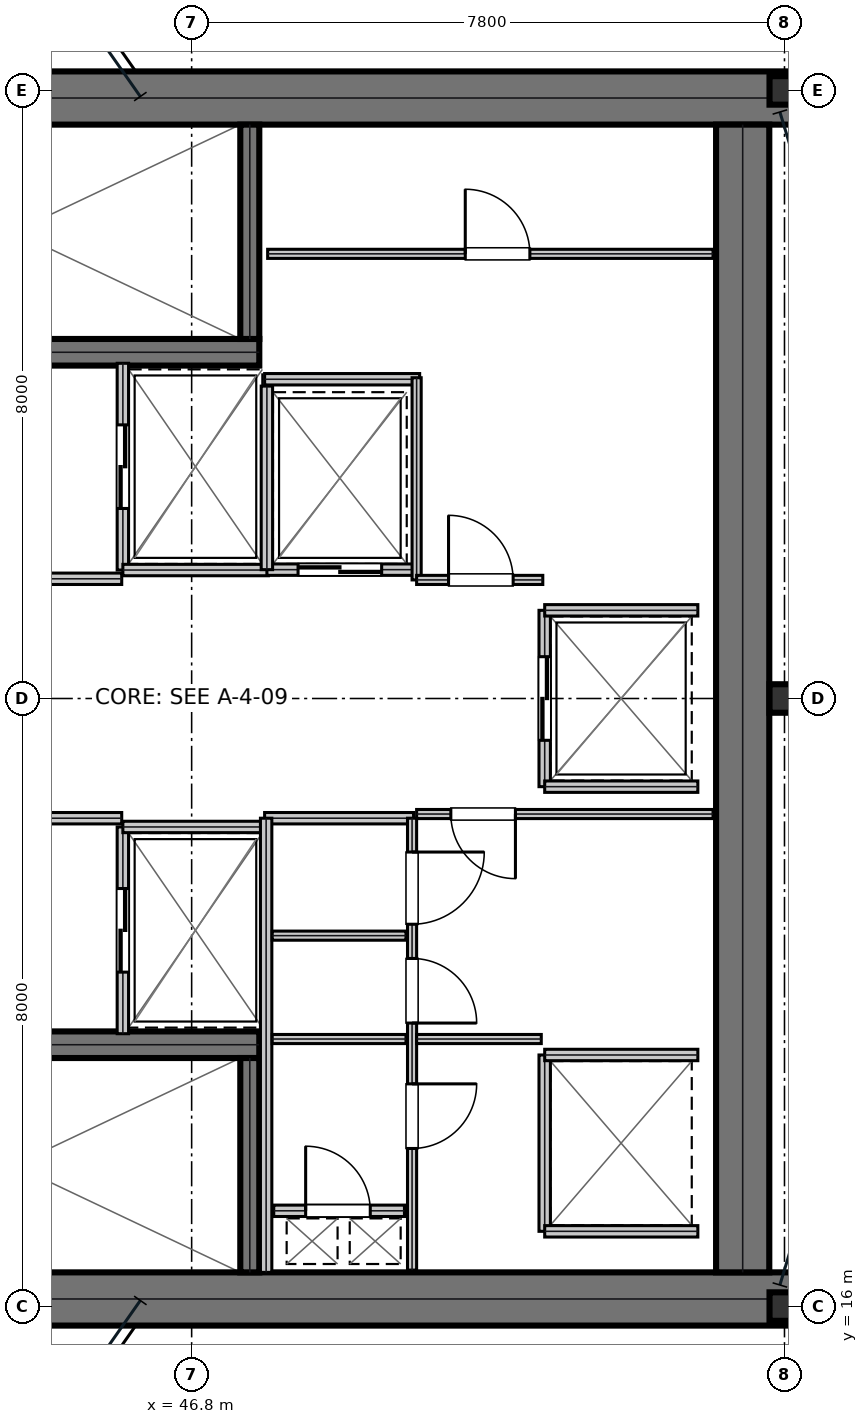
"""IFC4 building model, lengths in metres.
Left out: names, types, materials, properties, quantities, classifications, styles, units other than length and angle.
Written with IfcOpenShell. Run it as: python <this file> out.ifc"""

import sys

from ifc_helpers import new_model, si_unit, direction, frame, frame_2d, origin, origin_2d, place, context, subcontext, project, spatial, rectangle, i_section, extrude, element, fill, save


model = new_model("IFC4")
c1 = context("Model", 3, precision=1e-05, world=origin(), true_north=direction((0.0, 1.0)))
c2 = subcontext(c1, "Body", "Model", "MODEL_VIEW")
j1 = project(units=[si_unit("LENGTHUNIT", "METRE"), si_unit("PLANEANGLEUNIT", "RADIAN")], contexts=[c1])
p1 = place(None, origin())
s1 = spatial("IfcSite", under=j1, at=p1, CompositionType="ELEMENT")
p2 = place(p1, origin())
s2 = spatial("IfcBuilding", under=s1, at=p2, CompositionType="ELEMENT")
p3 = place(p2, frame((0.0, 0.0, 220.2)))
s3 = spatial("IfcBuildingStorey", under=s2, at=p3, CompositionType="ELEMENT", Elevation=220.2)
for number, where, z_axis, x_axis in (
    (1, (38.8, 31.9, 0.0), (0.0, 0.0, 1.0), (1.0, 0.0, 0.0)),
    (2, (38.8, 16.1, 0.0), (0.0, 0.0, 1.0), (1.0, 0.0, 0.0)),
):
    element("IfcWall", number, at=place(p3, frame(where, z_axis=z_axis, x_axis=x_axis)), inside=s3, PredefinedType="SHEAR", context=c2, shape_type="SweptSolid", body=[
        extrude(rectangle(XDim=16.0, YDim=0.7, at=frame_2d((8.0, 0.0))), origin(), (0.0, 0.0, 1.0), 3.79),
    ])
p4 = place(p3, frame((54.05, 16.45, 0.0), z_axis=(0.0, 0.0, 1.0), x_axis=(0.0, 1.0, 0.0)))
e3 = element("IfcWall", 3, at=p4, inside=s3, PredefinedType="SHEAR", context=c2, shape_type="SweptSolid", body=[
    extrude(rectangle(XDim=15.1, YDim=0.7, at=frame_2d((7.55, 0.0))), origin(), (0.0, 0.0, 1.0), 3.79),
])
p5 = place(p3, frame((39.98, 28.555, 0.0), z_axis=(0.0, 0.0, 1.0), x_axis=(1.0, 0.0, 0.0)))
e4 = element("IfcWall", 4, at=p5, inside=s3, PredefinedType="SHEAR", context=c2, shape_type="SweptSolid", body=[
    extrude(rectangle(XDim=7.71, YDim=0.35, at=frame_2d((3.855, 0.0))), origin(), (0.0, 0.0, 1.0), 3.79),
])
p6 = place(p5, frame((0.25, 0.0, 0.0)))
e5 = element("IfcOpeningElement", 5, at=p6, cuts=e4, PredefinedType="OPENING", context=c2, shape_type="SweptSolid", body=[
    extrude(rectangle(XDim=1.1, YDim=2.15, at=frame_2d((0.55, 1.075))), frame((0.0, 0.185, 0.0), z_axis=(0.0, -1.0, 0.0), x_axis=(1.0, 0.0, 0.0)), (0.0, 0.0, 1.0), 0.37),
])
p7 = place(p3, frame((39.98, 19.445, 0.0), z_axis=(0.0, 0.0, 1.0), x_axis=(1.0, 0.0, 0.0)))
e6 = element("IfcWall", 6, at=p7, inside=s3, PredefinedType="SHEAR", context=c2, shape_type="SweptSolid", body=[
    extrude(rectangle(XDim=7.71, YDim=0.35, at=frame_2d((3.855, 0.0))), origin(), (0.0, 0.0, 1.0), 3.79),
])
p8 = place(p7, frame((0.25, 0.0, 0.0)))
e7 = element("IfcOpeningElement", 7, at=p8, cuts=e6, PredefinedType="OPENING", context=c2, shape_type="SweptSolid", body=[
    extrude(rectangle(XDim=1.1, YDim=2.15, at=frame_2d((0.55, 1.075))), frame((0.0, 0.185, 0.0), z_axis=(0.0, -1.0, 0.0), x_axis=(1.0, 0.0, 0.0)), (0.0, 0.0, 1.0), 0.37),
])
for number, where, z_axis, x_axis in (
    (8, (47.565, 28.73, 0.0), (0.0, 0.0, 1.0), (0.0, 1.0, 0.0)),
    (9, (47.565, 16.45, 0.0), (0.0, 0.0, 1.0), (0.0, 1.0, 0.0)),
):
    element("IfcWall", number, at=place(p3, frame(where, z_axis=z_axis, x_axis=x_axis)), inside=s3, PredefinedType="SHEAR", context=c2, shape_type="SweptSolid", body=[
        extrude(rectangle(XDim=2.82, YDim=0.25, at=frame_2d((1.41, 0.0))), origin(), (0.0, 0.0, 1.0), 3.79),
    ])
for number, where, z_axis, x_axis in (
    (10, (54.6, 16.0, 0.0), (0.0, 0.0, 1.0), (1.0, 0.0, 0.0)),
    (11, (54.6, 24.0, 0.0), (0.0, 0.0, 1.0), (1.0, 0.0, 0.0)),
    (12, (54.6, 32.0, 0.0), (0.0, 0.0, 1.0), (1.0, 0.0, 0.0)),
):
    element("IfcColumn", number, at=place(p3, frame(where, z_axis=z_axis, x_axis=x_axis)), inside=s3, PredefinedType="COLUMN", context=c2, shape_type="SweptSolid", body=[
        extrude(i_section(OverallWidth=0.394, OverallDepth=0.375, WebThickness=0.017, FlangeThickness=0.028, at=origin_2d()), origin(), (0.0, 0.0, 1.0), 4.044),
    ])
p9 = place(p3, frame((39.98, 25.575, 0.0), z_axis=(0.0, 0.0, 1.0), x_axis=(1.0, 0.0, 0.0)))
e13 = element("IfcWall", 13, at=p9, inside=s3, PredefinedType="PARTITIONING", context=c2, shape_type="SweptSolid", body=[
    extrude(rectangle(XDim=5.9, YDim=0.15, at=frame_2d((2.95, 0.0))), origin(), (0.0, 0.0, 1.0), 3.79),
])
p10 = place(p9, frame((2.35, 0.0, 0.0)))
e14 = element("IfcOpeningElement", 14, at=p10, cuts=e13, PredefinedType="OPENING", context=c2, shape_type="SweptSolid", body=[
    extrude(rectangle(XDim=1.05, YDim=2.15, at=frame_2d((0.525, 1.075))), frame((0.0, 0.085, 0.0), z_axis=(0.0, -1.0, 0.0), x_axis=(1.0, 0.0, 0.0)), (0.0, 0.0, 1.0), 0.17),
])
p11 = place(p3, frame((39.98, 22.425, 0.0), z_axis=(0.0, 0.0, 1.0), x_axis=(1.0, 0.0, 0.0)))
e15 = element("IfcWall", 15, at=p11, inside=s3, PredefinedType="PARTITIONING", context=c2, shape_type="SweptSolid", body=[
    extrude(rectangle(XDim=5.9, YDim=0.15, at=frame_2d((2.95, 0.0))), origin(), (0.0, 0.0, 1.0), 3.79),
])
p12 = place(p11, frame((2.35, 0.0, 0.0)))
e16 = element("IfcOpeningElement", 16, at=p12, cuts=e15, PredefinedType="OPENING", context=c2, shape_type="SweptSolid", body=[
    extrude(rectangle(XDim=1.05, YDim=2.15, at=frame_2d((0.525, 1.075))), frame((0.0, 0.085, 0.0), z_axis=(0.0, -1.0, 0.0), x_axis=(1.0, 0.0, 0.0)), (0.0, 0.0, 1.0), 0.17),
])
p13 = place(p3, frame((45.895, 25.69, 0.0), z_axis=(0.0, 0.0, 1.0), x_axis=(0.0, 1.0, 0.0)))
e17 = element("IfcWall", 17, at=p13, inside=s3, PredefinedType="PARTITIONING", context=c2, shape_type="SweptSolid", body=[
    extrude(rectangle(XDim=2.72, YDim=0.15, at=frame_2d((1.36, 0.0))), origin(), (0.0, 0.0, 1.0), 3.79),
])
p14 = place(p13, frame((0.81, 0.0, 0.0)))
e18 = element("IfcOpeningElement", 18, at=p14, cuts=e17, PredefinedType="OPENING", context=c2, shape_type="SweptSolid", body=[
    extrude(rectangle(XDim=1.1, YDim=2.15, at=frame_2d((0.55, 1.075))), frame((0.0, 0.085, 0.0), z_axis=(0.0, -1.0, 0.0), x_axis=(1.0, 0.0, 0.0)), (0.0, 0.0, 1.0), 0.17),
])
p15 = place(p3, frame((45.895, 25.69, 0.0), z_axis=(0.0, 0.0, 1.0), x_axis=(1.0, 0.0, 0.0)))
e19 = element("IfcWall", 19, at=p15, inside=s3, PredefinedType="PARTITIONING", context=c2, shape_type="SweptSolid", body=[
    extrude(rectangle(XDim=1.915, YDim=0.15, at=frame_2d((0.958, 0.0))), origin(), (0.0, 0.0, 1.0), 3.79),
])
p16 = place(p3, frame((45.895, 19.59, 0.0), z_axis=(0.0, 0.0, 1.0), x_axis=(0.0, 1.0, 0.0)))
e20 = element("IfcWall", 20, at=p16, inside=s3, PredefinedType="PARTITIONING", context=c2, shape_type="SweptSolid", body=[
    extrude(rectangle(XDim=2.72, YDim=0.15, at=frame_2d((1.36, 0.0))), origin(), (0.0, 0.0, 1.0), 3.79),
])
p17 = place(p16, frame((0.81, 0.0, 0.0)))
e21 = element("IfcOpeningElement", 21, at=p17, cuts=e20, PredefinedType="OPENING", context=c2, shape_type="SweptSolid", body=[
    extrude(rectangle(XDim=1.1, YDim=2.15, at=frame_2d((0.55, 1.075))), frame((0.0, 0.085, 0.0), z_axis=(0.0, -1.0, 0.0), x_axis=(1.0, 0.0, 0.0)), (0.0, 0.0, 1.0), 0.17),
])
p18 = place(p3, frame((45.895, 22.31, 0.0), z_axis=(0.0, 0.0, 1.0), x_axis=(1.0, 0.0, 0.0)))
e22 = element("IfcWall", 22, at=p18, inside=s3, PredefinedType="PARTITIONING", context=c2, shape_type="SweptSolid", body=[
    extrude(rectangle(XDim=1.915, YDim=0.15, at=frame_2d((0.958, 0.0))), origin(), (0.0, 0.0, 1.0), 3.79),
])
p19 = place(p3, frame((47.79, 25.695, 0.0), z_axis=(0.0, 0.0, 1.0), x_axis=(1.0, 0.0, 0.0)))
e23 = element("IfcWall", 23, at=p19, inside=s3, PredefinedType="PARTITIONING", context=c2, shape_type="SweptSolid", body=[
    extrude(rectangle(XDim=1.92, YDim=0.15, at=frame_2d((0.96, 0.0))), origin(), (0.0, 0.0, 1.0), 3.79),
])
p20 = place(p19, frame((0.41, 0.0, 0.0)))
e24 = element("IfcOpeningElement", 24, at=p20, cuts=e23, PredefinedType="OPENING", context=c2, shape_type="SweptSolid", body=[
    extrude(rectangle(XDim=1.1, YDim=2.15, at=frame_2d((0.55, 1.075))), frame((0.0, 0.085, 0.0), z_axis=(0.0, -1.0, 0.0), x_axis=(1.0, 0.0, 0.0)), (0.0, 0.0, 1.0), 0.17),
])
p21 = place(p3, frame((47.79, 25.695, 0.0), z_axis=(0.0, 0.0, 1.0), x_axis=(0.0, 1.0, 0.0)))
e25 = element("IfcWall", 25, at=p21, inside=s3, PredefinedType="PARTITIONING", context=c2, shape_type="SweptSolid", body=[
    extrude(rectangle(XDim=2.415, YDim=0.15, at=frame_2d((1.208, 0.0))), origin(), (0.0, 0.0, 1.0), 3.79),
])
p22 = place(p3, frame((51.445, 22.84, 0.0), z_axis=(0.0, 0.0, 1.0), x_axis=(0.0, 1.0, 0.0)))
e26 = element("IfcWall", 26, at=p22, inside=s3, PredefinedType="PARTITIONING", context=c2, shape_type="SweptSolid", body=[
    extrude(rectangle(XDim=2.32, YDim=0.15, at=frame_2d((1.16, 0.0))), origin(), (0.0, 0.0, 1.0), 3.79),
])
p23 = place(p22, frame((0.61, 0.0, 0.0)))
e27 = element("IfcOpeningElement", 27, at=p23, cuts=e26, PredefinedType="OPENING", context=c2, shape_type="SweptSolid", body=[
    extrude(rectangle(XDim=1.1, YDim=2.15, at=frame_2d((0.55, 1.075))), frame((0.0, 0.085, 0.0), z_axis=(0.0, -1.0, 0.0), x_axis=(1.0, 0.0, 0.0)), (0.0, 0.0, 1.0), 0.17),
])
for number, where, z_axis, x_axis in (
    (28, (51.445, 22.84, 0.0), (0.0, 0.0, 1.0), (1.0, 0.0, 0.0)),
    (29, (51.445, 25.16, 0.0), (0.0, 0.0, 1.0), (1.0, 0.0, 0.0)),
):
    element("IfcWall", number, at=place(p3, frame(where, z_axis=z_axis, x_axis=x_axis)), inside=s3, PredefinedType="PARTITIONING", context=c2, shape_type="SweptSolid", body=[
        extrude(rectangle(XDim=2.015, YDim=0.15, at=frame_2d((1.007, 0.0))), origin(), (0.0, 0.0, 1.0), 3.79),
    ])
p24 = place(p3, frame((51.445, 16.99, 0.0), z_axis=(0.0, 0.0, 1.0), x_axis=(0.0, 1.0, 0.0)))
e30 = element("IfcWall", 30, at=p24, inside=s3, PredefinedType="PARTITIONING", context=c2, shape_type="SweptSolid", body=[
    extrude(rectangle(XDim=2.32, YDim=0.15, at=frame_2d((1.16, 0.0))), origin(), (0.0, 0.0, 1.0), 3.79),
])
for number, where, z_axis, x_axis in (
    (31, (51.445, 16.99, 0.0), (0.0, 0.0, 1.0), (1.0, 0.0, 0.0)),
    (32, (51.445, 19.31, 0.0), (0.0, 0.0, 1.0), (1.0, 0.0, 0.0)),
):
    element("IfcWall", number, at=place(p3, frame(where, z_axis=z_axis, x_axis=x_axis)), inside=s3, PredefinedType="PARTITIONING", context=c2, shape_type="SweptSolid", body=[
        extrude(rectangle(XDim=2.015, YDim=0.15, at=frame_2d((1.007, 0.0))), origin(), (0.0, 0.0, 1.0), 3.79),
    ])
p25 = place(p3, frame((47.88, 17.26, 0.0), z_axis=(0.0, 0.0, 1.0), x_axis=(1.0, 0.0, 0.0)))
e33 = element("IfcWall", 33, at=p25, inside=s3, PredefinedType="PARTITIONING", context=c2, shape_type="SweptSolid", body=[
    extrude(rectangle(XDim=1.72, YDim=0.15, at=frame_2d((0.86, 0.0))), origin(), (0.0, 0.0, 1.0), 3.79),
])
p26 = place(p25, frame((0.42, 0.0, 0.0)))
e34 = element("IfcOpeningElement", 34, at=p26, cuts=e33, PredefinedType="OPENING", context=c2, shape_type="SweptSolid", body=[
    extrude(rectangle(XDim=0.85, YDim=2.15, at=frame_2d((0.425, 1.075))), frame((0.0, 0.085, 0.0), z_axis=(0.0, -1.0, 0.0), x_axis=(1.0, 0.0, 0.0)), (0.0, 0.0, 1.0), 0.17),
])
p27 = place(p3, frame((47.76, 22.425, 0.0), z_axis=(0.0, 0.0, 1.0), x_axis=(1.0, 0.0, 0.0)))
e35 = element("IfcWall", 35, at=p27, inside=s3, PredefinedType="PARTITIONING", context=c2, shape_type="SweptSolid", body=[
    extrude(rectangle(XDim=1.96, YDim=0.15, at=frame_2d((0.98, 0.0))), origin(), (0.0, 0.0, 1.0), 3.79),
])
p28 = place(p3, frame((47.78, 16.45, 0.0), z_axis=(0.0, 0.0, 1.0), x_axis=(0.0, 1.0, 0.0)))
e36 = element("IfcWall", 36, at=p28, inside=s3, PredefinedType="PARTITIONING", context=c2, shape_type="SweptSolid", body=[
    extrude(rectangle(XDim=5.975, YDim=0.15, at=frame_2d((2.988, 0.0))), origin(), (0.0, 0.0, 1.0), 3.79),
])
for number, where, z_axis, x_axis in (
    (37, (47.86, 19.52, 0.0), (0.0, 0.0, 1.0), (1.0, 0.0, 0.0)),
    (38, (47.86, 20.88, 0.0), (0.0, 0.0, 1.0), (1.0, 0.0, 0.0)),
):
    element("IfcWall", number, at=place(p3, frame(where, z_axis=z_axis, x_axis=x_axis)), inside=s3, PredefinedType="PARTITIONING", context=c2, shape_type="SweptSolid", body=[
        extrude(rectangle(XDim=1.76, YDim=0.12, at=frame_2d((0.88, 0.0))), origin(), (0.0, 0.0, 1.0), 3.79),
    ])
p29 = place(p3, frame((49.7, 16.48, 0.0), z_axis=(0.0, 0.0, 1.0), x_axis=(0.0, 1.0, 0.0)))
e39 = element("IfcWall", 39, at=p29, inside=s3, PredefinedType="PARTITIONING", context=c2, shape_type="SweptSolid", body=[
    extrude(rectangle(XDim=5.945, YDim=0.12, at=frame_2d((2.973, 0.0))), origin(), (0.0, 0.0, 1.0), 3.79),
])
p30 = place(p29, frame((1.6, 0.0, 0.0)))
e40 = element("IfcOpeningElement", 40, at=p30, cuts=e39, PredefinedType="OPENING", context=c2, shape_type="SweptSolid", body=[
    extrude(rectangle(XDim=0.85, YDim=2.15, at=frame_2d((0.425, 1.075))), frame((0.0, 0.07, 0.0), z_axis=(0.0, -1.0, 0.0), x_axis=(1.0, 0.0, 0.0)), (0.0, 0.0, 1.0), 0.14),
])
p31 = place(p29, frame((3.25, 0.0, 0.0)))
e41 = element("IfcOpeningElement", 41, at=p31, cuts=e39, PredefinedType="OPENING", context=c2, shape_type="SweptSolid", body=[
    extrude(rectangle(XDim=0.85, YDim=2.15, at=frame_2d((0.425, 1.075))), frame((0.0, 0.07, 0.0), z_axis=(0.0, -1.0, 0.0), x_axis=(1.0, 0.0, 0.0)), (0.0, 0.0, 1.0), 0.14),
])
p32 = place(p29, frame((4.55, 0.0, 0.0)))
e42 = element("IfcOpeningElement", 42, at=p32, cuts=e39, PredefinedType="OPENING", context=c2, shape_type="SweptSolid", body=[
    extrude(rectangle(XDim=0.95, YDim=2.15, at=frame_2d((0.475, 1.075))), frame((0.0, 0.07, 0.0), z_axis=(0.0, -1.0, 0.0), x_axis=(1.0, 0.0, 0.0)), (0.0, 0.0, 1.0), 0.14),
])
p33 = place(p3, frame((49.76, 22.48, 0.0), z_axis=(0.0, 0.0, 1.0), x_axis=(1.0, 0.0, 0.0)))
e43 = element("IfcWall", 43, at=p33, inside=s3, PredefinedType="PARTITIONING", context=c2, shape_type="SweptSolid", body=[
    extrude(rectangle(XDim=3.9, YDim=0.12, at=frame_2d((1.95, 0.0))), origin(), (0.0, 0.0, 1.0), 3.79),
])
p34 = place(p33, frame((0.45, 0.0, 0.0)))
e44 = element("IfcOpeningElement", 44, at=p34, cuts=e43, PredefinedType="OPENING", context=c2, shape_type="SweptSolid", body=[
    extrude(rectangle(XDim=0.85, YDim=2.15, at=frame_2d((0.425, 1.075))), frame((0.0, 0.07, 0.0), z_axis=(0.0, -1.0, 0.0), x_axis=(1.0, 0.0, 0.0)), (0.0, 0.0, 1.0), 0.14),
])
p35 = place(p3, frame((49.76, 19.52, 0.0), z_axis=(0.0, 0.0, 1.0), x_axis=(1.0, 0.0, 0.0)))
e45 = element("IfcWall", 45, at=p35, inside=s3, PredefinedType="PARTITIONING", context=c2, shape_type="SweptSolid", body=[
    extrude(rectangle(XDim=1.64, YDim=0.12, at=frame_2d((0.82, 0.0))), origin(), (0.0, 0.0, 1.0), 3.79),
])
p36 = place(p3, frame((47.76, 28.2, 0.0), z_axis=(0.0, 0.0, 1.0), x_axis=(1.0, 0.0, 0.0)))
e46 = element("IfcWall", 46, at=p36, inside=s3, PredefinedType="PARTITIONING", context=c2, shape_type="SweptSolid", body=[
    extrude(rectangle(XDim=2.04, YDim=0.15, at=frame_2d((1.02, 0.0))), origin(), (0.0, 0.0, 1.0), 3.79),
])
p37 = place(p3, frame((49.76, 25.56, 0.0), z_axis=(0.0, 0.0, 1.0), x_axis=(0.0, 1.0, 0.0)))
e47 = element("IfcWall", 47, at=p37, inside=s3, PredefinedType="PARTITIONING", context=c2, shape_type="SweptSolid", body=[
    extrude(rectangle(XDim=2.66, YDim=0.12, at=frame_2d((1.33, 0.0))), origin(), (0.0, 0.0, 1.0), 3.79),
])
p38 = place(p3, frame((49.76, 25.56, 0.0), z_axis=(0.0, 0.0, 1.0), x_axis=(1.0, 0.0, 0.0)))
e48 = element("IfcWall", 48, at=p38, inside=s3, PredefinedType="PARTITIONING", context=c2, shape_type="SweptSolid", body=[
    extrude(rectangle(XDim=1.66, YDim=0.12, at=frame_2d((0.83, 0.0))), origin(), (0.0, 0.0, 1.0), 3.79),
])
p39 = place(p38, frame((0.42, 0.0, 0.0)))
e49 = element("IfcOpeningElement", 49, at=p39, cuts=e48, PredefinedType="OPENING", context=c2, shape_type="SweptSolid", body=[
    extrude(rectangle(XDim=0.85, YDim=2.15, at=frame_2d((0.425, 1.075))), frame((0.0, 0.07, 0.0), z_axis=(0.0, -1.0, 0.0), x_axis=(1.0, 0.0, 0.0)), (0.0, 0.0, 1.0), 0.14),
])
p40 = place(p3, frame((47.8, 29.85, 0.0), z_axis=(0.0, 0.0, 1.0), x_axis=(1.0, 0.0, 0.0)))
e50 = element("IfcWall", 50, at=p40, inside=s3, PredefinedType="PARTITIONING", context=c2, shape_type="SweptSolid", body=[
    extrude(rectangle(XDim=5.86, YDim=0.12, at=frame_2d((2.93, 0.0))), origin(), (0.0, 0.0, 1.0), 3.79),
])
p41 = place(p40, frame((2.6, 0.0, 0.0)))
e51 = element("IfcOpeningElement", 51, at=p41, cuts=e50, PredefinedType="OPENING", context=c2, shape_type="SweptSolid", body=[
    extrude(rectangle(XDim=0.85, YDim=2.15, at=frame_2d((0.425, 1.075))), frame((0.0, 0.07, 0.0), z_axis=(0.0, -1.0, 0.0), x_axis=(1.0, 0.0, 0.0)), (0.0, 0.0, 1.0), 0.14),
])
p42 = place(p14, frame((1.1, 0.0, 0.0), z_axis=(0.0, 0.0, 1.0), x_axis=(-1.0, 0.0, 0.0)))
e52 = element("IfcDoor", 52, at=p42, inside=s3, OperationType="DOUBLE_DOOR_SLIDING", PredefinedType="DOOR", context=c2, shape_type="SweptSolid", body=[
    extrude(rectangle(XDim=1.1, YDim=2.15, at=frame_2d((0.55, 1.075))), frame((0.0, 0.025, 0.0), z_axis=(0.0, -1.0, 0.0), x_axis=(1.0, 0.0, 0.0)), (0.0, 0.0, 1.0), 0.05),
])
fill(e18, e52)
p43 = place(p17, frame((1.1, 0.0, 0.0), z_axis=(0.0, 0.0, 1.0), x_axis=(-1.0, 0.0, 0.0)))
e53 = element("IfcDoor", 53, at=p43, inside=s3, OperationType="DOUBLE_DOOR_SLIDING", PredefinedType="DOOR", context=c2, shape_type="SweptSolid", body=[
    extrude(rectangle(XDim=1.1, YDim=2.15, at=frame_2d((0.55, 1.075))), frame((0.0, 0.025, 0.0), z_axis=(0.0, -1.0, 0.0), x_axis=(1.0, 0.0, 0.0)), (0.0, 0.0, 1.0), 0.05),
])
fill(e21, e53)
p44 = place(p20, frame((1.1, 0.0, 0.0), z_axis=(0.0, 0.0, 1.0), x_axis=(-1.0, 0.0, 0.0)))
e54 = element("IfcDoor", 54, at=p44, inside=s3, OperationType="DOUBLE_DOOR_SLIDING", PredefinedType="DOOR", context=c2, shape_type="SweptSolid", body=[
    extrude(rectangle(XDim=1.1, YDim=2.15, at=frame_2d((0.55, 1.075))), frame((0.0, 0.025, 0.0), z_axis=(0.0, -1.0, 0.0), x_axis=(1.0, 0.0, 0.0)), (0.0, 0.0, 1.0), 0.05),
])
fill(e24, e54)
p45 = place(p23, frame((1.1, 0.0, 0.0), z_axis=(0.0, 0.0, 1.0), x_axis=(-1.0, 0.0, 0.0)))
e55 = element("IfcDoor", 55, at=p45, inside=s3, OperationType="DOUBLE_DOOR_SLIDING", PredefinedType="DOOR", context=c2, shape_type="SweptSolid", body=[
    extrude(rectangle(XDim=1.1, YDim=2.15, at=frame_2d((0.55, 1.075))), frame((0.0, 0.025, 0.0), z_axis=(0.0, -1.0, 0.0), x_axis=(1.0, 0.0, 0.0)), (0.0, 0.0, 1.0), 0.05),
])
fill(e27, e55)
p46 = place(p26, origin())
e56 = element("IfcDoor", 56, at=p46, inside=s3, OperationType="SINGLE_SWING_LEFT", PredefinedType="TRAPDOOR", context=c2, shape_type="SweptSolid", body=[
    extrude(rectangle(XDim=0.85, YDim=2.15, at=frame_2d((0.425, 1.075))), frame((0.0, 0.025, 0.0), z_axis=(0.0, -1.0, 0.0), x_axis=(1.0, 0.0, 0.0)), (0.0, 0.0, 1.0), 0.05),
])
fill(e34, e56)
p47 = place(p30, frame((0.85, 0.0, 0.0), z_axis=(0.0, 0.0, 1.0), x_axis=(-1.0, 0.0, 0.0)))
e57 = element("IfcDoor", 57, at=p47, inside=s3, OperationType="SINGLE_SWING_LEFT", PredefinedType="DOOR", context=c2, shape_type="SweptSolid", body=[
    extrude(rectangle(XDim=0.85, YDim=2.15, at=frame_2d((0.425, 1.075))), frame((0.0, 0.025, 0.0), z_axis=(0.0, -1.0, 0.0), x_axis=(1.0, 0.0, 0.0)), (0.0, 0.0, 1.0), 0.05),
])
fill(e40, e57)
p48 = place(p31, frame((0.85, 0.0, 0.0), z_axis=(0.0, 0.0, 1.0), x_axis=(-1.0, 0.0, 0.0)))
e58 = element("IfcDoor", 58, at=p48, inside=s3, OperationType="SINGLE_SWING_RIGHT", PredefinedType="DOOR", context=c2, shape_type="SweptSolid", body=[
    extrude(rectangle(XDim=0.85, YDim=2.15, at=frame_2d((0.425, 1.075))), frame((0.0, 0.025, 0.0), z_axis=(0.0, -1.0, 0.0), x_axis=(1.0, 0.0, 0.0)), (0.0, 0.0, 1.0), 0.05),
])
fill(e41, e58)
p49 = place(p32, frame((0.95, 0.0, 0.0), z_axis=(0.0, 0.0, 1.0), x_axis=(-1.0, 0.0, 0.0)))
e59 = element("IfcDoor", 59, at=p49, inside=s3, OperationType="SINGLE_SWING_LEFT", PredefinedType="DOOR", context=c2, shape_type="SweptSolid", body=[
    extrude(rectangle(XDim=0.95, YDim=2.15, at=frame_2d((0.475, 1.075))), frame((0.0, 0.025, 0.0), z_axis=(0.0, -1.0, 0.0), x_axis=(1.0, 0.0, 0.0)), (0.0, 0.0, 1.0), 0.05),
])
fill(e42, e59)
p50 = place(p34, frame((0.85, 0.0, 0.0), z_axis=(0.0, 0.0, 1.0), x_axis=(-1.0, 0.0, 0.0)))
e60 = element("IfcDoor", 60, at=p50, inside=s3, OperationType="SINGLE_SWING_LEFT", PredefinedType="DOOR", context=c2, shape_type="SweptSolid", body=[
    extrude(rectangle(XDim=0.85, YDim=2.15, at=frame_2d((0.425, 1.075))), frame((0.0, 0.025, 0.0), z_axis=(0.0, -1.0, 0.0), x_axis=(1.0, 0.0, 0.0)), (0.0, 0.0, 1.0), 0.05),
])
fill(e44, e60)
p51 = place(p39, origin())
e61 = element("IfcDoor", 61, at=p51, inside=s3, OperationType="SINGLE_SWING_LEFT", PredefinedType="DOOR", context=c2, shape_type="SweptSolid", body=[
    extrude(rectangle(XDim=0.85, YDim=2.15, at=frame_2d((0.425, 1.075))), frame((0.0, 0.025, 0.0), z_axis=(0.0, -1.0, 0.0), x_axis=(1.0, 0.0, 0.0)), (0.0, 0.0, 1.0), 0.05),
])
fill(e49, e61)
p52 = place(p41, origin())
e62 = element("IfcDoor", 62, at=p52, inside=s3, OperationType="SINGLE_SWING_LEFT", PredefinedType="DOOR", context=c2, shape_type="SweptSolid", body=[
    extrude(rectangle(XDim=0.85, YDim=2.15, at=frame_2d((0.425, 1.075))), frame((0.0, 0.025, 0.0), z_axis=(0.0, -1.0, 0.0), x_axis=(1.0, 0.0, 0.0)), (0.0, 0.0, 1.0), 0.05),
])
fill(e51, e62)
save(model, sys.argv[1])
